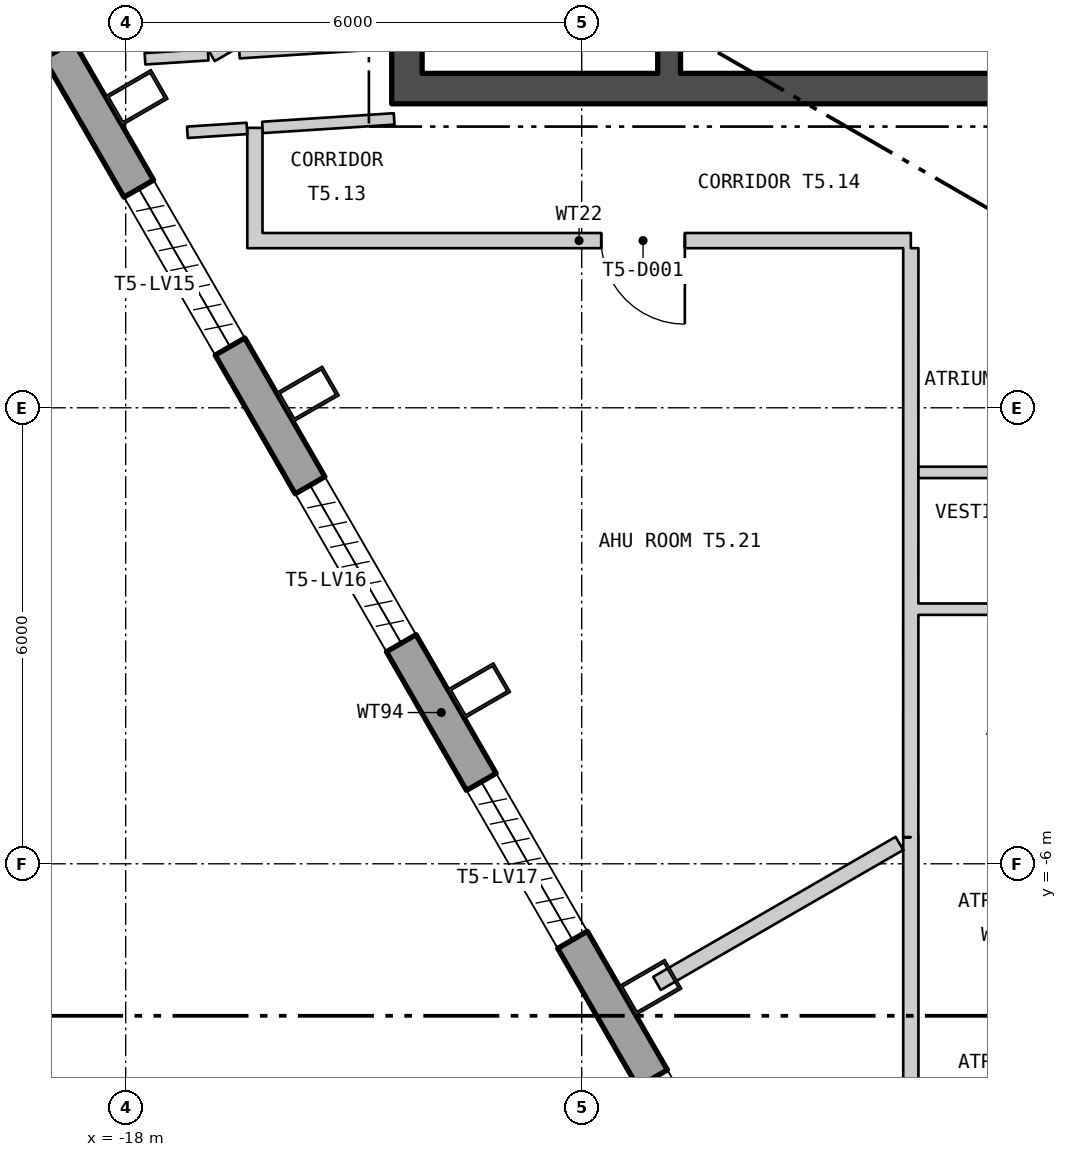
"""IFC4 building model, lengths in metres.
Left out: names, types, materials, properties, quantities, classifications, styles, units other than length and angle.
Written with IfcOpenShell. Run it as: python <this file> out.ifc"""

import sys

from ifc_helpers import new_model, si_unit, direction, frame, frame_2d, origin, origin_2d, place, context, subcontext, project, spatial, polyline, rectangle, hollow_rectangle, outline, extrude, element, fill, save


model = new_model("IFC4")
c1 = context("Model", 3, precision=1e-05, world=origin(), true_north=direction((0.0, 1.0)))
c2 = subcontext(c1, "Body", "Model", "MODEL_VIEW")
j1 = project(units=[si_unit("LENGTHUNIT", "METRE"), si_unit("PLANEANGLEUNIT", "RADIAN")], contexts=[c1])
p1 = place(None, origin())
s1 = spatial("IfcSite", under=j1, at=p1, CompositionType="ELEMENT")
p2 = place(p1, origin())
s2 = spatial("IfcBuilding", under=s1, at=p2, CompositionType="ELEMENT")
p3 = place(p2, frame((0.0, 0.0, 292.2)))
s3 = spatial("IfcBuildingStorey", under=s2, at=p3, CompositionType="ELEMENT", Elevation=292.2)
for number, where, z_axis, x_axis in (
    (1, (-17.856, 4.083, 0.0), (0.0, 0.0, 1.0), (0.5, -0.866, 0.0)),
    (2, (-15.603, 0.181, 0.0), (0.0, 0.0, 1.0), (0.5, -0.866, 0.0)),
    (3, (-13.35, -3.722, 0.0), (0.0, 0.0, 1.0), (0.5, -0.866, 0.0)),
    (4, (-11.096, -7.625, 0.0), (0.0, 0.0, 1.0), (0.5, -0.866, 0.0)),
):
    element("IfcColumn", number, at=place(p3, frame(where, z_axis=z_axis, x_axis=x_axis)), inside=s3, PredefinedType="COLUMN", context=c2, shape_type="SweptSolid", body=[
        extrude(hollow_rectangle(XDim=0.45, YDim=0.7, WallThickness=0.04, at=origin_2d()), origin(), (0.0, 0.0, 1.0), 6.0),
    ])
p4 = place(p3, frame((-25.28, 15.792, -0.18), z_axis=(0.0, 0.0, 1.0), x_axis=(0.500000141277, -0.866025322218, 0.0)))
e5 = element("IfcWall", 5, at=p4, inside=s3, PredefinedType="SOLIDWALL", context=c2, shape_type="SweptSolid", body=[
    extrude(outline(polyline([(-0.13, -0.225), (45.86, -0.225), (45.6, 0.225), (0.13, 0.225), (-0.13, -0.225)])), origin(), (0.0, 0.0, 1.0), 5.9),
])
p5 = place(p4, frame((1.424, 0.0, 1.38)))
e6 = element("IfcOpeningElement", 6, at=p5, cuts=e5, PredefinedType="OPENING", context=c2, shape_type="SweptSolid", body=[
    extrude(rectangle(XDim=2.4, YDim=3.6, at=frame_2d((1.2, 1.8))), frame((0.0, 0.235, 0.0), z_axis=(0.0, -1.0, 0.0), x_axis=(1.0, 0.0, 0.0)), (0.0, 0.0, 1.0), 0.47),
])
p6 = place(p4, frame((5.892, 0.0, 1.38)))
e7 = element("IfcOpeningElement", 7, at=p6, cuts=e5, PredefinedType="OPENING", context=c2, shape_type="SweptSolid", body=[
    extrude(rectangle(XDim=2.4, YDim=3.6, at=frame_2d((1.2, 1.8))), frame((0.0, 0.235, 0.0), z_axis=(0.0, -1.0, 0.0), x_axis=(1.0, 0.0, 0.0)), (0.0, 0.0, 1.0), 0.47),
])
p7 = place(p4, frame((10.399, 0.0, 1.38)))
e8 = element("IfcOpeningElement", 8, at=p7, cuts=e5, PredefinedType="OPENING", context=c2, shape_type="SweptSolid", body=[
    extrude(rectangle(XDim=2.4, YDim=3.6, at=frame_2d((1.2, 1.8))), frame((0.0, 0.235, 0.0), z_axis=(0.0, -1.0, 0.0), x_axis=(1.0, 0.0, 0.0)), (0.0, 0.0, 1.0), 0.47),
])
p8 = place(p4, frame((14.905, 0.0, 1.38)))
e9 = element("IfcOpeningElement", 9, at=p8, cuts=e5, PredefinedType="OPENING", context=c2, shape_type="SweptSolid", body=[
    extrude(rectangle(XDim=2.4, YDim=3.6, at=frame_2d((1.2, 1.8))), frame((0.0, 0.235, 0.0), z_axis=(0.0, -1.0, 0.0), x_axis=(1.0, 0.0, 0.0)), (0.0, 0.0, 1.0), 0.47),
])
p9 = place(p4, frame((19.412, 0.0, 1.38)))
e10 = element("IfcOpeningElement", 10, at=p9, cuts=e5, PredefinedType="OPENING", context=c2, shape_type="SweptSolid", body=[
    extrude(rectangle(XDim=2.4, YDim=3.6, at=frame_2d((1.2, 1.8))), frame((0.0, 0.235, 0.0), z_axis=(0.0, -1.0, 0.0), x_axis=(1.0, 0.0, 0.0)), (0.0, 0.0, 1.0), 0.47),
])
p10 = place(p4, frame((23.918, 0.0, 1.38)))
e11 = element("IfcOpeningElement", 11, at=p10, cuts=e5, PredefinedType="OPENING", context=c2, shape_type="SweptSolid", body=[
    extrude(rectangle(XDim=2.4, YDim=3.6, at=frame_2d((1.2, 1.8))), frame((0.0, 0.235, 0.0), z_axis=(0.0, -1.0, 0.0), x_axis=(1.0, 0.0, 0.0)), (0.0, 0.0, 1.0), 0.47),
])
p11 = place(p4, frame((28.425, 0.0, 1.38)))
e12 = element("IfcOpeningElement", 12, at=p11, cuts=e5, PredefinedType="OPENING", context=c2, shape_type="SweptSolid", body=[
    extrude(rectangle(XDim=2.4, YDim=3.6, at=frame_2d((1.2, 1.8))), frame((0.0, 0.235, 0.0), z_axis=(0.0, -1.0, 0.0), x_axis=(1.0, 0.0, 0.0)), (0.0, 0.0, 1.0), 0.47),
])
p12 = place(p4, frame((32.932, 0.0, 1.38)))
e13 = element("IfcOpeningElement", 13, at=p12, cuts=e5, PredefinedType="OPENING", context=c2, shape_type="SweptSolid", body=[
    extrude(rectangle(XDim=2.4, YDim=3.6, at=frame_2d((1.2, 1.8))), frame((0.0, 0.235, 0.0), z_axis=(0.0, -1.0, 0.0), x_axis=(1.0, 0.0, 0.0)), (0.0, 0.0, 1.0), 0.47),
])
p13 = place(p4, frame((37.438, 0.0, 1.38)))
e14 = element("IfcOpeningElement", 14, at=p13, cuts=e5, PredefinedType="OPENING", context=c2, shape_type="SweptSolid", body=[
    extrude(rectangle(XDim=2.4, YDim=3.6, at=frame_2d((1.2, 1.8))), frame((0.0, 0.235, 0.0), z_axis=(0.0, -1.0, 0.0), x_axis=(1.0, 0.0, 0.0)), (0.0, 0.0, 1.0), 0.47),
])
p14 = place(p4, frame((41.907, 0.0, 1.38)))
e15 = element("IfcOpeningElement", 15, at=p14, cuts=e5, PredefinedType="OPENING", context=c2, shape_type="SweptSolid", body=[
    extrude(rectangle(XDim=2.4, YDim=3.6, at=frame_2d((1.2, 1.8))), frame((0.0, 0.235, 0.0), z_axis=(0.0, -1.0, 0.0), x_axis=(1.0, 0.0, 0.0)), (0.0, 0.0, 1.0), 0.47),
])
p15 = place(p3, frame((-14.5, 4.2, 0.0), z_axis=(0.0, 0.0, 1.0), x_axis=(1.0, 0.0, 0.0)))
e16 = element("IfcWall", 16, at=p15, inside=s3, PredefinedType="SHEAR", context=c2, shape_type="SweptSolid", body=[
    extrude(rectangle(XDim=29.0, YDim=0.4, at=frame_2d((14.5, 0.0))), origin(), (0.0, 0.0, 1.0), 5.7),
])
p16 = place(p15, frame((9.0, 0.0, 0.0)))
e17 = element("IfcOpeningElement", 17, at=p16, cuts=e16, PredefinedType="OPENING", context=c2, shape_type="SweptSolid", body=[
    extrude(rectangle(XDim=1.8, YDim=2.4, at=frame_2d((0.9, 1.2))), frame((0.0, 0.21, 0.0), z_axis=(0.0, -1.0, 0.0), x_axis=(1.0, 0.0, 0.0)), (0.0, 0.0, 1.0), 0.42),
])
p17 = place(p15, frame((19.0, 0.0, 0.0)))
e18 = element("IfcOpeningElement", 18, at=p17, cuts=e16, PredefinedType="OPENING", context=c2, shape_type="SweptSolid", body=[
    extrude(rectangle(XDim=1.8, YDim=2.4, at=frame_2d((0.9, 1.2))), frame((0.0, 0.21, 0.0), z_axis=(0.0, -1.0, 0.0), x_axis=(1.0, 0.0, 0.0)), (0.0, 0.0, 1.0), 0.42),
])
p18 = place(p3, frame((-14.3, 4.4, 0.0), z_axis=(0.0, 0.0, 1.0), x_axis=(0.0, 1.0, 0.0)))
e19 = element("IfcWall", 19, at=p18, inside=s3, PredefinedType="SHEAR", context=c2, shape_type="SweptSolid", body=[
    extrude(rectangle(XDim=13.2, YDim=0.4, at=frame_2d((6.6, 0.0))), origin(), (0.0, 0.0, 1.0), 5.7),
])
p19 = place(p18, frame((3.05, 0.0, 0.0)))
e20 = element("IfcOpeningElement", 20, at=p19, cuts=e19, PredefinedType="OPENING", context=c2, shape_type="SweptSolid", body=[
    extrude(rectangle(XDim=1.5, YDim=2.1, at=frame_2d((0.75, 1.05))), frame((0.0, 0.21, 0.0), z_axis=(0.0, -1.0, 0.0), x_axis=(1.0, 0.0, 0.0)), (0.0, 0.0, 1.0), 0.42),
])
p20 = place(p3, frame((-10.85, 4.4, 0.0), z_axis=(0.0, 0.0, 1.0), x_axis=(0.0, 1.0, 0.0)))
e21 = element("IfcWall", 21, at=p20, inside=s3, PredefinedType="SHEAR", context=c2, shape_type="SweptSolid", body=[
    extrude(rectangle(XDim=13.2, YDim=0.3, at=frame_2d((6.6, 0.0))), origin(), (0.0, 0.0, 1.0), 5.7),
])
p21 = place(p20, frame((1.575, 0.0, 0.0)))
e22 = element("IfcOpeningElement", 22, at=p21, cuts=e21, PredefinedType="OPENING", context=c2, shape_type="SweptSolid", body=[
    extrude(rectangle(XDim=1.25, YDim=2.1, at=frame_2d((0.625, 1.05))), frame((0.0, 0.16, 0.0), z_axis=(0.0, -1.0, 0.0), x_axis=(1.0, 0.0, 0.0)), (0.0, 0.0, 1.0), 0.32),
])
p22 = place(p20, frame((0.4, 0.0, 0.0)))
e23 = element("IfcOpeningElement", 23, at=p22, cuts=e21, PredefinedType="OPENING", context=c2, shape_type="SweptSolid", body=[
    extrude(rectangle(XDim=0.9, YDim=2.1, at=frame_2d((0.45, 1.05))), frame((0.0, 0.16, 0.0), z_axis=(0.0, -1.0, 0.0), x_axis=(1.0, 0.0, 0.0)), (0.0, 0.0, 1.0), 0.32),
])
p23 = place(p3, frame((-17.746, 4.592, 0.0), z_axis=(0.0, 0.0, 1.0), x_axis=(0.997972330248, 0.063649258127, 0.0)))
e24 = element("IfcWall", 24, at=p23, inside=s3, PredefinedType="PARTITIONING", context=c2, shape_type="SweptSolid", body=[
    extrude(rectangle(XDim=0.833, YDim=0.15, at=frame_2d((0.416, 0.0))), origin(), (0.0, 0.0, 1.0), 5.7),
])
p24 = place(p3, frame((-17.188, 3.625, 0.0), z_axis=(0.0, 0.0, 1.0), x_axis=(0.997885500156, 0.064996373573, 0.0)))
e25 = element("IfcWall", 25, at=p24, inside=s3, PredefinedType="PARTITIONING", context=c2, shape_type="SweptSolid", body=[
    extrude(rectangle(XDim=0.785, YDim=0.15, at=frame_2d((0.392, 0.0))), origin(), (0.0, 0.0, 1.0), 5.7),
])
p25 = place(p3, frame((-16.878, 4.648, 0.0), z_axis=(0.0, 0.0, 1.0), x_axis=(0.865683861507, 0.500591102524, 0.0)))
e26 = element("IfcWall", 26, at=p25, inside=s3, PredefinedType="PARTITIONING", context=c2, shape_type="SweptSolid", body=[
    extrude(rectangle(XDim=0.531, YDim=0.2, at=frame_2d((0.266, 0.0))), origin(), (0.0, 0.0, 1.0), 5.7),
])
p26 = place(p3, frame((-16.504, 4.672, 0.0), z_axis=(0.0, 0.0, 1.0), x_axis=(0.997932644153, 0.064268481647, 0.0)))
e27 = element("IfcWall", 27, at=p26, inside=s3, PredefinedType="PARTITIONING", context=c2, shape_type="SweptSolid", body=[
    extrude(rectangle(XDim=1.976, YDim=0.15, at=frame_2d((0.988, 0.0))), origin(), (0.0, 0.0, 1.0), 5.7),
])
p27 = place(p3, frame((-16.4, 2.2, 0.0), z_axis=(0.0, 0.0, 1.0), x_axis=(1.0, 0.0, 0.0)))
e28 = element("IfcWall", 28, at=p27, inside=s3, PredefinedType="PARTITIONING", context=c2, shape_type="SweptSolid", body=[
    extrude(rectangle(XDim=8.73, YDim=0.2, at=frame_2d((4.365, 0.0))), origin(), (0.0, 0.0, 1.0), 5.7),
])
p28 = place(p27, frame((4.657, 0.0, 0.0)))
e29 = element("IfcOpeningElement", 29, at=p28, cuts=e28, PredefinedType="OPENING", context=c2, shape_type="SweptSolid", body=[
    extrude(rectangle(XDim=1.1, YDim=2.1, at=frame_2d((0.55, 1.05))), frame((0.0, 0.11, 0.0), z_axis=(0.0, -1.0, 0.0), x_axis=(1.0, 0.0, 0.0)), (0.0, 0.0, 1.0), 0.22),
])
p29 = place(p3, frame((-16.3, 2.3, 0.0), z_axis=(0.0, 0.0, 1.0), x_axis=(0.0, 1.0, 0.0)))
e30 = element("IfcWall", 30, at=p29, inside=s3, PredefinedType="PARTITIONING", context=c2, shape_type="SweptSolid", body=[
    extrude(rectangle(XDim=1.383, YDim=0.2, at=frame_2d((0.692, 0.0))), origin(), (0.0, 0.0, 1.0), 5.7),
])
p30 = place(p3, frame((-16.2, 3.689, 0.0), z_axis=(0.0, 0.0, 1.0), x_axis=(0.997915745008, 0.064530348407, 0.0)))
e31 = element("IfcWall", 31, at=p30, inside=s3, PredefinedType="PARTITIONING", context=c2, shape_type="SweptSolid", body=[
    extrude(rectangle(XDim=1.736, YDim=0.15, at=frame_2d((0.868, 0.0))), origin(), (0.0, 0.0, 1.0), 5.7),
])
p31 = place(p3, frame((-11.01, -7.574, 0.0), z_axis=(0.0, 0.0, 1.0), x_axis=(0.865995704065, 0.500051437896, 0.0)))
e32 = element("IfcWall", 32, at=p31, inside=s3, PredefinedType="PARTITIONING", context=c2, shape_type="SweptSolid", body=[
    extrude(rectangle(XDim=3.684, YDim=0.2, at=frame_2d((1.842, 0.0))), origin(), (0.0, 0.0, 1.0), 5.7),
])
p32 = place(p3, frame((-7.671, -5.65, 0.0), z_axis=(0.0, 0.0, 1.0), x_axis=(0.000129032257, 0.999999991675, 0.0)))
e33 = element("IfcWall", 33, at=p32, inside=s3, PredefinedType="PARTITIONING", context=c2, shape_type="SweptSolid", body=[
    extrude(rectangle(XDim=7.75, YDim=0.2, at=frame_2d((3.875, 0.0))), origin(), (0.0, 0.0, 1.0), 5.7),
])
p33 = place(p3, frame((-7.67, -13.7, 0.0), z_axis=(0.0, 0.0, 1.0), x_axis=(0.0, 1.0, 0.0)))
e34 = element("IfcWall", 34, at=p33, inside=s3, PredefinedType="PARTITIONING", context=c2, shape_type="SweptSolid", body=[
    extrude(rectangle(XDim=8.05, YDim=0.2, at=frame_2d((4.025, 0.0))), origin(), (0.0, 0.0, 1.0), 5.7),
])
p34 = place(p3, frame((-7.571, -2.65, 0.0), z_axis=(0.0, 0.0, 1.0), x_axis=(1.0, 0.0, 0.0)))
e35 = element("IfcWall", 35, at=p34, inside=s3, PredefinedType="PARTITIONING", context=c2, shape_type="SweptSolid", body=[
    extrude(rectangle(XDim=3.301, YDim=0.15, at=frame_2d((1.651, 0.0))), origin(), (0.0, 0.0, 1.0), 5.7),
])
p35 = place(p34, frame((1.675, 0.0, 0.0)))
e36 = element("IfcOpeningElement", 36, at=p35, cuts=e35, PredefinedType="OPENING", context=c2, shape_type="SweptSolid", body=[
    extrude(rectangle(XDim=1.0, YDim=2.1, at=frame_2d((0.5, 1.05))), frame((0.0, 0.085, 0.0), z_axis=(0.0, -1.0, 0.0), x_axis=(1.0, 0.0, 0.0)), (0.0, 0.0, 1.0), 0.17),
])
p36 = place(p3, frame((-7.57, -0.85, 0.0), z_axis=(0.0, 0.0, 1.0), x_axis=(1.0, 0.0, 0.0)))
e37 = element("IfcWall", 37, at=p36, inside=s3, PredefinedType="PARTITIONING", context=c2, shape_type="SweptSolid", body=[
    extrude(rectangle(XDim=3.3, YDim=0.15, at=frame_2d((1.65, 0.0))), origin(), (0.0, 0.0, 1.0), 5.7),
])
p37 = place(p36, frame((1.15, 0.0, 0.0)))
e38 = element("IfcOpeningElement", 38, at=p37, cuts=e37, PredefinedType="OPENING", context=c2, shape_type="SweptSolid", body=[
    extrude(rectangle(XDim=1.0, YDim=2.1, at=frame_2d((0.5, 1.05))), frame((0.0, 0.085, 0.0), z_axis=(0.0, -1.0, 0.0), x_axis=(1.0, 0.0, 0.0)), (0.0, 0.0, 1.0), 0.17),
])
p38 = place(p28, origin())
e39 = element("IfcDoor", 39, at=p38, inside=s3, OperationType="SINGLE_SWING_RIGHT", PredefinedType="DOOR", context=c2, shape_type="SweptSolid", body=[
    extrude(rectangle(XDim=1.1, YDim=2.1, at=frame_2d((0.55, 1.05))), frame((0.0, 0.025, 0.0), z_axis=(0.0, -1.0, 0.0), x_axis=(1.0, 0.0, 0.0)), (0.0, 0.0, 1.0), 0.05),
])
fill(e29, e39)
save(model, sys.argv[1])
